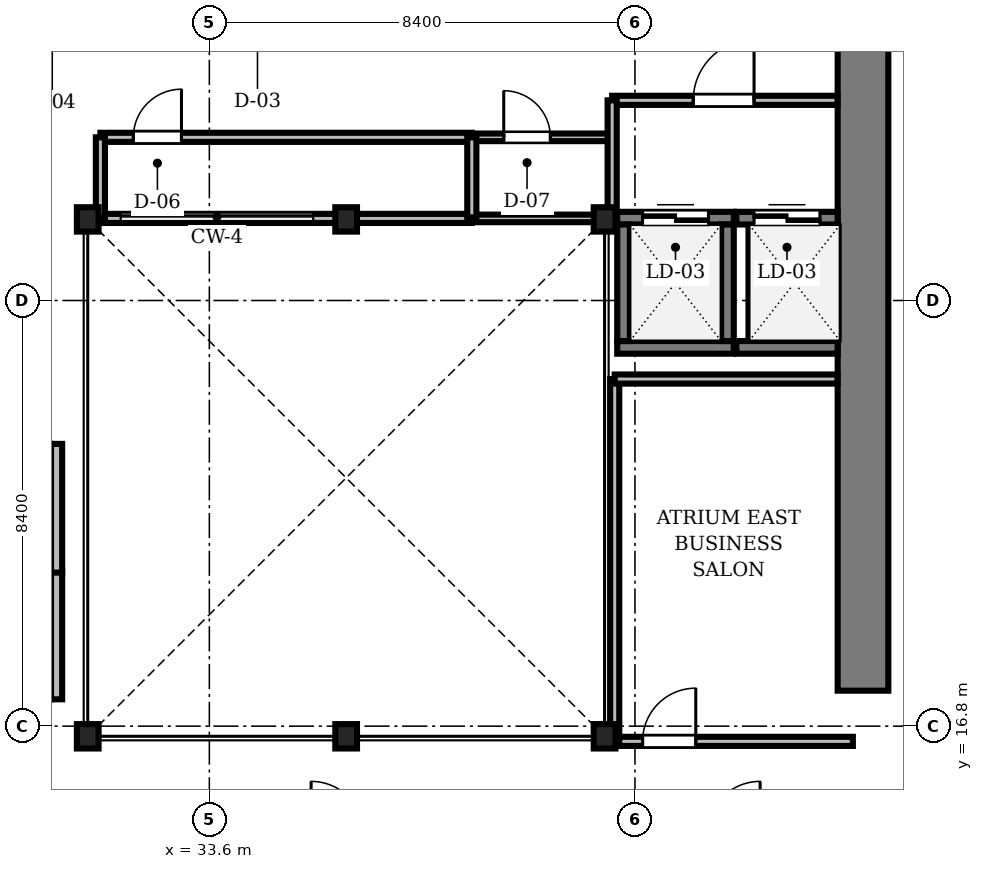
"""IFC4 building model, lengths in metres.
Left out: names, types, materials, properties, quantities, classifications, styles, units other than length and angle.
Written with IfcOpenShell. Run it as: python <this file> out.ifc"""

import sys

from ifc_helpers import new_model, si_unit, direction, frame, frame_2d, origin, origin_2d, place, context, subcontext, project, spatial, rectangle, i_section, extrude, source, transform, mapped, element, fill, save


model = new_model("IFC4")
c1 = context("Model", 3, precision=1e-05, world=origin(), true_north=direction((0.0, 1.0)))
c2 = subcontext(c1, "Body", "Model", "MODEL_VIEW")
j1 = project(units=[si_unit("LENGTHUNIT", "METRE"), si_unit("PLANEANGLEUNIT", "RADIAN")], contexts=[c1])
p1 = place(None, origin())
s1 = spatial("IfcSite", under=j1, at=p1, CompositionType="ELEMENT")
p2 = place(p1, origin())
s2 = spatial("IfcBuilding", under=s1, at=p2, CompositionType="ELEMENT")
p3 = place(p2, frame((0.0, 0.0, 27.6)))
s3 = spatial("IfcBuildingStorey", under=s2, at=p3, CompositionType="ELEMENT", Elevation=27.6)
m1 = source(origin(), c2, "Body", "SweptSolid", [
    extrude(rectangle(XDim=13.15, YDim=1.0, at=frame_2d((6.575, 0.0))), origin(), (0.0, 0.0, 1.0), 3.41),
])
p4 = place(p3, frame((46.5, 17.5, 0.0), z_axis=(0.0, 0.0, 1.0), x_axis=(0.0, 1.0, 0.0)))
e1 = element("IfcWall", 1, at=p4, inside=s3, PredefinedType="SHEAR", context=c2, shape_type="MappedRepresentation", body=[
    mapped(m1, transform((0.0, 0.0, 0.0), scale=1.0)),
])
m2 = source(origin(), c2, "Body", "SweptSolid", [
    extrude(i_section(OverallWidth=0.428, OverallDepth=0.481, WebThickness=0.04, FlangeThickness=0.063, FilletRadius=0.015, at=origin_2d()), origin(), (0.0, 0.0, 1.0), 3.41),
])
for number, where, z_axis, x_axis in (
    (2, (31.2, 16.6, 0.0), (0.0, 0.0, 1.0), (1.0, 0.0, 0.0)),
    (3, (36.3, 16.6, 0.0), (0.0, 0.0, 1.0), (1.0, 0.0, 0.0)),
    (4, (41.4, 16.6, 0.0), (0.0, 0.0, 1.0), (1.0, 0.0, 0.0)),
    (5, (41.4, 26.8, 0.0), (0.0, 0.0, 1.0), (1.0, 0.0, 0.0)),
    (6, (36.3, 26.8, 0.0), (0.0, 0.0, 1.0), (1.0, 0.0, 0.0)),
    (7, (31.2, 26.8, 0.0), (0.0, 0.0, 1.0), (1.0, 0.0, 0.0)),
):
    element("IfcColumn", number, at=place(p3, frame(where, z_axis=z_axis, x_axis=x_axis)), inside=s3, PredefinedType="COLUMN", context=c2, shape_type="MappedRepresentation", body=[
        mapped(m2, transform((0.0, 0.0, 0.0), scale=1.0)),
    ])
m3 = source(origin(), c2, "Body", "SweptSolid", [
    extrude(rectangle(XDim=2.54, YDim=0.22, at=frame_2d((1.27, 0.0))), origin(), (0.0, 0.0, 1.0), 3.41),
])
for number, where, z_axis, x_axis in (
    (8, (30.585, 17.33, 0.0), (0.0, 0.0, 1.0), (0.0, 1.0, 0.0)),
    (9, (30.585, 19.83, 0.0), (0.0, 0.0, 1.0), (0.0, 1.0, 0.0)),
):
    element("IfcWall", number, at=place(p3, frame(where, z_axis=z_axis, x_axis=x_axis)), inside=s3, PredefinedType="SOLIDWALL", context=c2, shape_type="MappedRepresentation", body=[
        mapped(m3, transform((0.0, 0.0, 0.0), scale=1.0)),
    ])
m4 = source(origin(), c2, "Body", "SweptSolid", [
    extrude(rectangle(XDim=2.3, YDim=0.25, at=frame_2d((1.15, 0.0))), origin(), (0.0, 0.0, 1.0), 3.41),
])
p5 = place(p3, frame((41.65, 24.275, 0.0), z_axis=(0.0, 0.0, 1.0), x_axis=(1.0, 0.0, 0.0)))
e10 = element("IfcWall", 10, at=p5, inside=s3, PredefinedType="SOLIDWALL", context=c2, shape_type="MappedRepresentation", body=[
    mapped(m4, transform((0.0, 0.0, 0.0), scale=1.0)),
])
p6 = place(p3, frame((41.65, 26.825, 0.0), z_axis=(0.0, 0.0, 1.0), x_axis=(1.0, 0.0, 0.0)))
e11 = element("IfcWall", 11, at=p6, inside=s3, PredefinedType="SOLIDWALL", context=c2, shape_type="MappedRepresentation", body=[
    mapped(m4, transform((0.0, 0.0, 0.0), scale=1.0)),
])
m5 = source(origin(), c2, "Body", "SweptSolid", [
    extrude(rectangle(XDim=1.3, YDim=2.3, at=frame_2d((0.65, 1.15))), frame((0.0, 0.135, 0.0), z_axis=(0.0, -1.0, 0.0), x_axis=(1.0, 0.0, 0.0)), (0.0, 0.0, 1.0), 0.27),
])
p7 = place(p6, frame((0.5, 0.0, 0.0)))
e12 = element("IfcOpeningElement", 12, at=p7, cuts=e11, PredefinedType="OPENING", context=c2, shape_type="MappedRepresentation", body=[
    mapped(m5, transform((0.0, 0.0, 0.0), scale=1.0)),
])
for number, where, z_axis, x_axis in (
    (13, (41.775, 24.4, 0.0), (0.0, 0.0, 1.0), (0.0, 1.0, 0.0)),
    (14, (43.825, 24.4, 0.0), (0.0, 0.0, 1.0), (0.0, 1.0, 0.0)),
):
    element("IfcWall", number, at=place(p3, frame(where, z_axis=z_axis, x_axis=x_axis)), inside=s3, PredefinedType="SOLIDWALL", context=c2, shape_type="MappedRepresentation", body=[
        mapped(m4, transform((0.0, 0.0, 0.0), scale=1.0)),
    ])
m6 = source(origin(), c2, "Body", "SweptSolid", [
    extrude(rectangle(XDim=2.0, YDim=0.25, at=frame_2d((1.0, 0.0))), origin(), (0.0, 0.0, 1.0), 3.41),
])
p8 = place(p3, frame((44.0, 24.275, 0.0), z_axis=(0.0, 0.0, 1.0), x_axis=(1.0, 0.0, 0.0)))
e15 = element("IfcWall", 15, at=p8, inside=s3, PredefinedType="SOLIDWALL", context=c2, shape_type="MappedRepresentation", body=[
    mapped(m6, transform((0.0, 0.0, 0.0), scale=1.0)),
])
p9 = place(p3, frame((44.0, 26.825, 0.0), z_axis=(0.0, 0.0, 1.0), x_axis=(1.0, 0.0, 0.0)))
e16 = element("IfcWall", 16, at=p9, inside=s3, PredefinedType="SOLIDWALL", context=c2, shape_type="MappedRepresentation", body=[
    mapped(m6, transform((0.0, 0.0, 0.0), scale=1.0)),
])
p10 = place(p9, frame((0.35, 0.0, 0.0)))
e17 = element("IfcOpeningElement", 17, at=p10, cuts=e16, PredefinedType="OPENING", context=c2, shape_type="MappedRepresentation", body=[
    mapped(m5, transform((0.0, 0.0, 0.0), scale=1.0)),
])
m7 = source(origin(), c2, "Body", "SweptSolid", [
    extrude(rectangle(XDim=7.33, YDim=0.18, at=frame_2d((3.665, 0.0))), origin(), (0.0, 0.0, 1.0), 3.042),
])
p11 = place(p3, frame((31.45, 28.42, 0.0), z_axis=(0.0, 0.0, 1.0), x_axis=(1.0, 0.0, 0.0)))
e18 = element("IfcWall", 18, at=p11, inside=s3, PredefinedType="PARTITIONING", context=c2, shape_type="MappedRepresentation", body=[
    mapped(m7, transform((0.0, 0.0, 0.0), scale=1.0)),
])
m8 = source(origin(), c2, "Body", "SweptSolid", [
    extrude(rectangle(XDim=0.95, YDim=2.15, at=frame_2d((0.475, 1.075))), frame((0.0, 0.1, 0.0), z_axis=(0.0, -1.0, 0.0), x_axis=(1.0, 0.0, 0.0)), (0.0, 0.0, 1.0), 0.2),
])
p12 = place(p11, frame((0.65, 0.0, 0.0)))
e19 = element("IfcOpeningElement", 19, at=p12, cuts=e18, PredefinedType="OPENING", context=c2, shape_type="MappedRepresentation", body=[
    mapped(m8, transform((0.0, 0.0, 0.0), scale=1.0)),
])
m9 = source(origin(), c2, "Body", "SweptSolid", [
    extrude(rectangle(XDim=4.448, YDim=0.18, at=frame_2d((2.224, 0.0))), origin(), (0.0, 0.0, 1.0), 3.042),
])
p13 = place(p3, frame((41.55, 29.15, 0.0), z_axis=(0.0, 0.0, 1.0), x_axis=(1.0, 0.0, 0.0)))
e20 = element("IfcWall", 20, at=p13, inside=s3, PredefinedType="PARTITIONING", context=c2, shape_type="MappedRepresentation", body=[
    mapped(m9, transform((0.0, 0.0, 0.0), scale=1.0)),
])
m10 = source(origin(), c2, "Body", "SweptSolid", [
    extrude(rectangle(XDim=1.2, YDim=2.2, at=frame_2d((0.6, 1.1))), frame((0.0, 0.1, 0.0), z_axis=(0.0, -1.0, 0.0), x_axis=(1.0, 0.0, 0.0)), (0.0, 0.0, 1.0), 0.2),
])
p14 = place(p13, frame((1.6, 0.0, 0.0)))
e21 = element("IfcOpeningElement", 21, at=p14, cuts=e20, PredefinedType="OPENING", context=c2, shape_type="MappedRepresentation", body=[
    mapped(m10, transform((0.0, 0.0, 0.0), scale=1.0)),
])
m11 = source(origin(), c2, "Body", "SweptSolid", [
    extrude(rectangle(XDim=4.7, YDim=0.18, at=frame_2d((2.35, 0.0))), origin(), (0.0, 0.0, 1.0), 2.802),
])
p15 = place(p3, frame((41.6, 16.5, 0.0), z_axis=(0.0, 0.0, 1.0), x_axis=(1.0, 0.0, 0.0)))
e22 = element("IfcWall", 22, at=p15, inside=s3, PredefinedType="PARTITIONING", context=c2, shape_type="MappedRepresentation", body=[
    mapped(m11, transform((0.0, 0.0, 0.0), scale=1.0)),
])
m12 = source(origin(), c2, "Body", "SweptSolid", [
    extrude(rectangle(XDim=1.05, YDim=2.2, at=frame_2d((0.525, 1.1))), frame((0.0, 0.1, 0.0), z_axis=(0.0, -1.0, 0.0), x_axis=(1.0, 0.0, 0.0)), (0.0, 0.0, 1.0), 0.2),
])
p16 = place(p15, frame((0.55, 0.0, 0.0)))
e23 = element("IfcOpeningElement", 23, at=p16, cuts=e22, PredefinedType="OPENING", context=c2, shape_type="MappedRepresentation", body=[
    mapped(m12, transform((0.0, 0.0, 0.0), scale=1.0)),
])
m13 = source(origin(), c2, "Body", "SweptSolid", [
    extrude(rectangle(XDim=2.74, YDim=0.15, at=frame_2d((1.37, 0.0))), origin(), (0.0, 0.0, 1.0), 3.41),
])
p17 = place(p3, frame((38.78, 28.42, 0.0), z_axis=(0.0, 0.0, 1.0), x_axis=(1.0, 0.0, 0.0)))
e24 = element("IfcWall", 24, at=p17, inside=s3, PredefinedType="PARTITIONING", context=c2, shape_type="MappedRepresentation", body=[
    mapped(m13, transform((0.0, 0.0, 0.0), scale=1.0)),
])
m14 = source(origin(), c2, "Body", "SweptSolid", [
    extrude(rectangle(XDim=0.92, YDim=2.1, at=frame_2d((0.46, 1.05))), frame((0.0, 0.085, 0.0), z_axis=(0.0, -1.0, 0.0), x_axis=(1.0, 0.0, 0.0)), (0.0, 0.0, 1.0), 0.17),
])
p18 = place(p17, frame((0.63, 0.0, 0.0)))
e25 = element("IfcOpeningElement", 25, at=p18, cuts=e24, PredefinedType="OPENING", context=c2, shape_type="MappedRepresentation", body=[
    mapped(m14, transform((0.0, 0.0, 0.0), scale=1.0)),
])
m15 = source(origin(), c2, "Body", "SweptSolid", [
    extrude(rectangle(XDim=7.33, YDim=0.18, at=frame_2d((3.665, 0.0))), origin(), (0.0, 0.0, 1.0), 2.952),
])
p19 = place(p3, frame((31.45, 26.82, 0.0), z_axis=(0.0, 0.0, 1.0), x_axis=(1.0, 0.0, 0.0)))
e26 = element("IfcWall", 26, at=p19, inside=s3, PredefinedType="PARTITIONING", context=c2, shape_type="MappedRepresentation", body=[
    mapped(m15, transform((0.0, 0.0, 0.0), scale=1.0)),
])
m16 = source(origin(), c2, "Body", "SweptSolid", [
    extrude(rectangle(XDim=7.15, YDim=0.18, at=frame_2d((3.575, 0.0))), origin(), (0.0, 0.0, 1.0), 2.802),
])
p20 = place(p3, frame((41.6, 16.5, 0.0), z_axis=(0.0, 0.0, 1.0), x_axis=(0.0, 1.0, 0.0)))
e27 = element("IfcWall", 27, at=p20, inside=s3, PredefinedType="PARTITIONING", context=c2, shape_type="MappedRepresentation", body=[
    mapped(m16, transform((0.0, 0.0, 0.0), scale=1.0)),
])
m17 = source(origin(), c2, "Body", "SweptSolid", [
    extrude(rectangle(XDim=4.398, YDim=0.18, at=frame_2d((2.199, 0.0))), origin(), (0.0, 0.0, 1.0), 3.41),
])
p21 = place(p3, frame((41.6, 23.65, 0.0), z_axis=(0.0, 0.0, 1.0), x_axis=(1.0, 0.0, 0.0)))
e28 = element("IfcWall", 28, at=p21, inside=s3, PredefinedType="PARTITIONING", context=c2, shape_type="MappedRepresentation", body=[
    mapped(m17, transform((0.0, 0.0, 0.0), scale=1.0)),
])
m18 = source(origin(), c2, "Body", "SweptSolid", [
    extrude(rectangle(XDim=2.74, YDim=0.15, at=frame_2d((1.37, 0.0))), origin(), (0.0, 0.0, 1.0), 2.802),
])
p22 = place(p3, frame((38.78, 26.82, 0.0), z_axis=(0.0, 0.0, 1.0), x_axis=(1.0, 0.0, 0.0)))
e29 = element("IfcWall", 29, at=p22, inside=s3, PredefinedType="PARTITIONING", context=c2, shape_type="MappedRepresentation", body=[
    mapped(m18, transform((0.0, 0.0, 0.0), scale=1.0)),
])
m19 = source(origin(), c2, "Body", "SweptSolid", [
    extrude(rectangle(XDim=2.35, YDim=0.18, at=frame_2d((1.175, 0.0))), origin(), (0.0, 0.0, 1.0), 2.802),
])
p23 = place(p3, frame((41.55, 26.8, 0.0), z_axis=(0.0, 0.0, 1.0), x_axis=(0.0, 1.0, 0.0)))
e30 = element("IfcWall", 30, at=p23, inside=s3, PredefinedType="PARTITIONING", context=c2, shape_type="MappedRepresentation", body=[
    mapped(m19, transform((0.0, 0.0, 0.0), scale=1.0)),
])
m20 = source(origin(), c2, "Body", "SweptSolid", [
    extrude(rectangle(XDim=1.6, YDim=0.18, at=frame_2d((0.8, 0.0))), origin(), (0.0, 0.0, 1.0), 2.952),
])
for number, where, z_axis, x_axis in (
    (31, (31.45, 26.82, 0.0), (0.0, 0.0, 1.0), (0.0, 1.0, 0.0)),
    (32, (38.78, 26.82, 0.0), (0.0, 0.0, 1.0), (0.0, 1.0, 0.0)),
):
    element("IfcWall", number, at=place(p3, frame(where, z_axis=z_axis, x_axis=x_axis)), inside=s3, PredefinedType="PARTITIONING", context=c2, shape_type="MappedRepresentation", body=[
        mapped(m20, transform((0.0, 0.0, 0.0), scale=1.0)),
    ])
m21 = source(origin(), c2, "Body", "SweptSolid", [
    extrude(rectangle(XDim=1.3, YDim=2.3, at=frame_2d((0.65, 1.15))), frame((0.0, 0.025, 0.0), z_axis=(0.0, -1.0, 0.0), x_axis=(1.0, 0.0, 0.0)), (0.0, 0.0, 1.0), 0.05),
])
p24 = place(p7, origin())
e33 = element("IfcDoor", 33, at=p24, inside=s3, OperationType="DOUBLE_DOOR_SLIDING", PredefinedType="DOOR", context=c2, shape_type="MappedRepresentation", body=[
    mapped(m21, transform((0.0, 0.0, 0.0), scale=1.0)),
])
fill(e12, e33)
p25 = place(p10, origin())
e34 = element("IfcDoor", 34, at=p25, inside=s3, OperationType="DOUBLE_DOOR_SLIDING", PredefinedType="DOOR", context=c2, shape_type="MappedRepresentation", body=[
    mapped(m21, transform((0.0, 0.0, 0.0), scale=1.0)),
])
fill(e17, e34)
m22 = source(origin(), c2, "Body", "SweptSolid", [
    extrude(rectangle(XDim=0.95, YDim=2.15, at=frame_2d((0.475, 1.075))), frame((0.0, 0.025, 0.0), z_axis=(0.0, -1.0, 0.0), x_axis=(1.0, 0.0, 0.0)), (0.0, 0.0, 1.0), 0.05),
])
p26 = place(p12, origin())
e35 = element("IfcDoor", 35, at=p26, inside=s3, OperationType="SINGLE_SWING_RIGHT", PredefinedType="DOOR", context=c2, shape_type="MappedRepresentation", body=[
    mapped(m22, transform((0.0, 0.0, 0.0), scale=1.0)),
])
fill(e19, e35)
m23 = source(origin(), c2, "Body", "SweptSolid", [
    extrude(rectangle(XDim=1.2, YDim=2.2, at=frame_2d((0.6, 1.1))), frame((0.0, 0.025, 0.0), z_axis=(0.0, -1.0, 0.0), x_axis=(1.0, 0.0, 0.0)), (0.0, 0.0, 1.0), 0.05),
])
p27 = place(p14, origin())
e36 = element("IfcDoor", 36, at=p27, inside=s3, OperationType="SINGLE_SWING_RIGHT", PredefinedType="DOOR", context=c2, shape_type="MappedRepresentation", body=[
    mapped(m23, transform((0.0, 0.0, 0.0), scale=1.0)),
])
fill(e21, e36)
m24 = source(origin(), c2, "Body", "SweptSolid", [
    extrude(rectangle(XDim=1.05, YDim=2.2, at=frame_2d((0.525, 1.1))), frame((0.0, 0.025, 0.0), z_axis=(0.0, -1.0, 0.0), x_axis=(1.0, 0.0, 0.0)), (0.0, 0.0, 1.0), 0.05),
])
p28 = place(p16, origin())
e37 = element("IfcDoor", 37, at=p28, inside=s3, OperationType="SINGLE_SWING_RIGHT", PredefinedType="DOOR", context=c2, shape_type="MappedRepresentation", body=[
    mapped(m24, transform((0.0, 0.0, 0.0), scale=1.0)),
])
fill(e23, e37)
m25 = source(origin(), c2, "Body", "SweptSolid", [
    extrude(rectangle(XDim=0.92, YDim=2.1, at=frame_2d((0.46, 1.05))), frame((0.0, 0.025, 0.0), z_axis=(0.0, -1.0, 0.0), x_axis=(1.0, 0.0, 0.0)), (0.0, 0.0, 1.0), 0.05),
])
p29 = place(p18, origin())
e38 = element("IfcDoor", 38, at=p29, inside=s3, OperationType="SINGLE_SWING_LEFT", PredefinedType="DOOR", context=c2, shape_type="MappedRepresentation", body=[
    mapped(m25, transform((0.0, 0.0, 0.0), scale=1.0)),
])
fill(e25, e38)
save(model, sys.argv[1])
